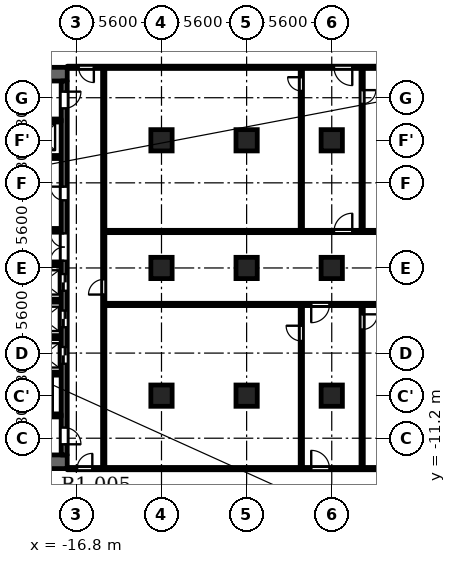
"""IFC4 building model, lengths in metres.
Left out: names, types, materials, properties, quantities, classifications, styles, units other than length and angle.
Written with IfcOpenShell. Run it as: python <this file> out.ifc"""

import sys

from ifc_helpers import new_model, si_unit, direction, frame, frame_2d, origin, origin_2d, place, context, subcontext, project, spatial, rectangle, extrude, element, fill, save


model = new_model("IFC4")
c1 = context("Model", 3, precision=1e-05, world=origin(), true_north=direction((0.0, 1.0)))
c2 = subcontext(c1, "Body", "Model", "MODEL_VIEW")
j1 = project(units=[si_unit("LENGTHUNIT", "METRE"), si_unit("PLANEANGLEUNIT", "RADIAN")], contexts=[c1])
p1 = place(None, origin())
s1 = spatial("IfcSite", under=j1, at=p1, CompositionType="ELEMENT")
p2 = place(p1, origin())
s2 = spatial("IfcBuilding", under=s1, at=p2, CompositionType="ELEMENT")
p3 = place(p2, frame((0.0, 0.0, -4.5)))
s3 = spatial("IfcBuildingStorey", under=s2, at=p3, CompositionType="ELEMENT", Elevation=-4.5)
for number, where, z_axis, x_axis in (
    (1, (-11.2, -8.4, 0.0), (0.0, 0.0, 1.0), (1.0, 0.0, 0.0)),
    (2, (-11.2, 8.4, 0.0), (0.0, 0.0, 1.0), (1.0, 0.0, 0.0)),
    (3, (-5.6, -8.4, 0.0), (0.0, 0.0, 1.0), (1.0, 0.0, 0.0)),
    (4, (-5.6, 8.4, 0.0), (0.0, 0.0, 1.0), (1.0, 0.0, 0.0)),
    (5, (0.0, -8.4, 0.0), (0.0, 0.0, 1.0), (1.0, 0.0, 0.0)),
    (6, (0.0, 8.4, 0.0), (0.0, 0.0, 1.0), (1.0, 0.0, 0.0)),
    (7, (-11.2, 0.0, 0.0), (0.0, 0.0, 1.0), (1.0, 0.0, 0.0)),
    (8, (-5.6, 0.0, 0.0), (0.0, 0.0, 1.0), (1.0, 0.0, 0.0)),
    (9, (0.0, 0.0, 0.0), (0.0, 0.0, 1.0), (1.0, 0.0, 0.0)),
):
    element("IfcColumn", number, at=place(p3, frame(where, z_axis=z_axis, x_axis=x_axis)), inside=s3, PredefinedType="COLUMN", context=c2, shape_type="SweptSolid", body=[
        extrude(rectangle(XDim=1.4, YDim=1.4, at=origin_2d()), origin(), (0.0, 0.0, 1.0), 4.5),
    ])
for number, where, z_axis, x_axis in (
    (10, (-17.4, 12.75, 0.0), (0.0, 0.0, 1.0), (-1.0, 0.0, 0.0)),
    (11, (-17.4, -12.75, 0.0), (0.0, 0.0, 1.0), (-1.0, 0.0, 0.0)),
):
    element("IfcWall", number, at=place(p3, frame(where, z_axis=z_axis, x_axis=x_axis)), inside=s3, PredefinedType="SHEAR", context=c2, shape_type="SweptSolid", body=[
        extrude(rectangle(XDim=10.4, YDim=0.9, at=frame_2d((5.2, 0.0))), origin(), (0.0, 0.0, 1.0), 4.05),
    ])
p4 = place(p3, frame((-17.6, -12.3, 0.0), z_axis=(0.0, 0.0, 1.0), x_axis=(0.0, 1.0, 0.0)))
e12 = element("IfcWall", 12, at=p4, inside=s3, PredefinedType="SHEAR", context=c2, shape_type="SweptSolid", body=[
    extrude(rectangle(XDim=24.6, YDim=0.4, at=frame_2d((12.3, 0.0))), origin(), (0.0, 0.0, 1.0), 4.05),
])
p5 = place(p4, frame((6.0, 0.0, 0.0)))
e13 = element("IfcOpeningElement", 13, at=p5, cuts=e12, PredefinedType="OPENING", context=c2, shape_type="SweptSolid", body=[
    extrude(rectangle(XDim=1.1, YDim=2.1, at=frame_2d((0.55, 1.05))), frame((0.0, 0.21, 0.0), z_axis=(0.0, -1.0, 0.0), x_axis=(1.0, 0.0, 0.0)), (0.0, 0.0, 1.0), 0.42),
])
p6 = place(p4, frame((8.4, 0.0, 0.0)))
e14 = element("IfcOpeningElement", 14, at=p6, cuts=e12, PredefinedType="OPENING", context=c2, shape_type="SweptSolid", body=[
    extrude(rectangle(XDim=1.1, YDim=2.1, at=frame_2d((0.55, 1.05))), frame((0.0, 0.21, 0.0), z_axis=(0.0, -1.0, 0.0), x_axis=(1.0, 0.0, 0.0)), (0.0, 0.0, 1.0), 0.42),
])
p7 = place(p4, frame((10.8, 0.0, 0.0)))
e15 = element("IfcOpeningElement", 15, at=p7, cuts=e12, PredefinedType="OPENING", context=c2, shape_type="SweptSolid", body=[
    extrude(rectangle(XDim=1.1, YDim=2.1, at=frame_2d((0.55, 1.05))), frame((0.0, 0.21, 0.0), z_axis=(0.0, -1.0, 0.0), x_axis=(1.0, 0.0, 0.0)), (0.0, 0.0, 1.0), 0.42),
])
p8 = place(p4, frame((16.75, 0.0, 0.0)))
e16 = element("IfcOpeningElement", 16, at=p8, cuts=e12, PredefinedType="OPENING", context=c2, shape_type="SweptSolid", body=[
    extrude(rectangle(XDim=0.9, YDim=2.1, at=frame_2d((0.45, 1.05))), frame((0.0, 0.21, 0.0), z_axis=(0.0, -1.0, 0.0), x_axis=(1.0, 0.0, 0.0)), (0.0, 0.0, 1.0), 0.42),
])
p9 = place(p4, frame((22.8, 0.0, 0.0)))
e17 = element("IfcOpeningElement", 17, at=p9, cuts=e12, PredefinedType="OPENING", context=c2, shape_type="SweptSolid", body=[
    extrude(rectangle(XDim=1.1, YDim=2.1, at=frame_2d((0.55, 1.05))), frame((0.0, 0.21, 0.0), z_axis=(0.0, -1.0, 0.0), x_axis=(1.0, 0.0, 0.0)), (0.0, 0.0, 1.0), 0.42),
])
p10 = place(p4, frame((0.7, 0.0, 0.0)))
e18 = element("IfcOpeningElement", 18, at=p10, cuts=e12, PredefinedType="OPENING", context=c2, shape_type="SweptSolid", body=[
    extrude(rectangle(XDim=1.1, YDim=2.1, at=frame_2d((0.55, 1.05))), frame((0.0, 0.21, 0.0), z_axis=(0.0, -1.0, 0.0), x_axis=(1.0, 0.0, 0.0)), (0.0, 0.0, 1.0), 0.42),
])
p11 = place(p4, frame((12.775, 0.0, 0.0)))
e19 = element("IfcOpeningElement", 19, at=p11, cuts=e12, PredefinedType="OPENING", context=c2, shape_type="SweptSolid", body=[
    extrude(rectangle(XDim=1.8, YDim=2.1, at=frame_2d((0.9, 1.05))), frame((0.0, 0.21, 0.0), z_axis=(0.0, -1.0, 0.0), x_axis=(1.0, 0.0, 0.0)), (0.0, 0.0, 1.0), 0.42),
])
p12 = place(p3, frame((-17.8, -9.7, 0.0), z_axis=(0.0, 0.0, 1.0), x_axis=(-1.0, 0.0, 0.0)))
e20 = element("IfcWall", 20, at=p12, inside=s3, PredefinedType="SHEAR", context=c2, shape_type="SweptSolid", body=[
    extrude(rectangle(XDim=8.3, YDim=0.2, at=frame_2d((4.15, 0.0))), origin(), (0.0, 0.0, 1.0), 4.05),
])
p13 = place(p12, frame((0.85, 0.0, 0.0)))
e21 = element("IfcOpeningElement", 21, at=p13, cuts=e20, PredefinedType="OPENING", context=c2, shape_type="SweptSolid", body=[
    extrude(rectangle(XDim=1.1, YDim=2.1, at=frame_2d((0.55, 1.05))), frame((0.0, 0.11, 0.0), z_axis=(0.0, -1.0, 0.0), x_axis=(1.0, 0.0, 0.0)), (0.0, 0.0, 1.0), 0.22),
])
p14 = place(p12, frame((3.75, 0.0, 0.0)))
e22 = element("IfcOpeningElement", 22, at=p14, cuts=e20, PredefinedType="OPENING", context=c2, shape_type="SweptSolid", body=[
    extrude(rectangle(XDim=1.1, YDim=2.1, at=frame_2d((0.55, 1.05))), frame((0.0, 0.11, 0.0), z_axis=(0.0, -1.0, 0.0), x_axis=(1.0, 0.0, 0.0)), (0.0, 0.0, 1.0), 0.22),
])
for number, where, z_axis, x_axis in (
    (23, (-17.8, -6.95, 0.0), (0.0, 0.0, 1.0), (-1.0, 0.0, 0.0)),
    (24, (-17.8, -4.55, 0.0), (0.0, 0.0, 1.0), (-1.0, 0.0, 0.0)),
    (25, (-17.8, -2.15, 0.0), (0.0, 0.0, 1.0), (-1.0, 0.0, 0.0)),
):
    element("IfcWall", number, at=place(p3, frame(where, z_axis=z_axis, x_axis=x_axis)), inside=s3, PredefinedType="PARTITIONING", context=c2, shape_type="SweptSolid", body=[
        extrude(rectangle(XDim=2.8, YDim=0.2, at=frame_2d((1.4, 0.0))), origin(), (0.0, 0.0, 1.0), 4.05),
    ])
for number, where, z_axis, x_axis in (
    (26, (-17.8, 0.25, 0.0), (0.0, 0.0, 1.0), (-1.0, 0.0, 0.0)),
    (27, (-17.8, 2.5, 0.0), (0.0, 0.0, 1.0), (-1.0, 0.0, 0.0)),
):
    element("IfcWall", number, at=place(p3, frame(where, z_axis=z_axis, x_axis=x_axis)), inside=s3, PredefinedType="PARTITIONING", context=c2, shape_type="SweptSolid", body=[
        extrude(rectangle(XDim=3.0, YDim=0.2, at=frame_2d((1.5, 0.0))), origin(), (0.0, 0.0, 1.0), 4.05),
    ])
p15 = place(p3, frame((-17.8, 7.3, 0.0), z_axis=(0.0, 0.0, 1.0), x_axis=(-1.0, 0.0, 0.0)))
e28 = element("IfcWall", 28, at=p15, inside=s3, PredefinedType="PARTITIONING", context=c2, shape_type="SweptSolid", body=[
    extrude(rectangle(XDim=2.8, YDim=0.2, at=frame_2d((1.4, 0.0))), origin(), (0.0, 0.0, 1.0), 4.05),
])
p16 = place(p3, frame((-17.8, 9.7, 0.0), z_axis=(0.0, 0.0, 1.0), x_axis=(-1.0, 0.0, 0.0)))
e29 = element("IfcWall", 29, at=p16, inside=s3, PredefinedType="SHEAR", context=c2, shape_type="SweptSolid", body=[
    extrude(rectangle(XDim=8.3, YDim=0.2, at=frame_2d((4.15, 0.0))), origin(), (0.0, 0.0, 1.0), 4.05),
])
p17 = place(p16, frame((0.85, 0.0, 0.0)))
e30 = element("IfcOpeningElement", 30, at=p17, cuts=e29, PredefinedType="OPENING", context=c2, shape_type="SweptSolid", body=[
    extrude(rectangle(XDim=1.1, YDim=2.1, at=frame_2d((0.55, 1.05))), frame((0.0, 0.11, 0.0), z_axis=(0.0, -1.0, 0.0), x_axis=(1.0, 0.0, 0.0)), (0.0, 0.0, 1.0), 0.22),
])
p18 = place(p16, frame((3.75, 0.0, 0.0)))
e31 = element("IfcOpeningElement", 31, at=p18, cuts=e29, PredefinedType="OPENING", context=c2, shape_type="SweptSolid", body=[
    extrude(rectangle(XDim=1.1, YDim=2.1, at=frame_2d((0.55, 1.05))), frame((0.0, 0.11, 0.0), z_axis=(0.0, -1.0, 0.0), x_axis=(1.0, 0.0, 0.0)), (0.0, 0.0, 1.0), 0.22),
])
p19 = place(p3, frame((-17.4, -13.2, 0.0), z_axis=(0.0, 0.0, 1.0), x_axis=(1.0, 0.0, 0.0)))
e32 = element("IfcWall", 32, at=p19, inside=s3, PredefinedType="PARTITIONING", context=c2, shape_type="SweptSolid", body=[
    extrude(rectangle(XDim=34.8, YDim=0.15, at=frame_2d((17.4, 0.0))), origin(), (0.0, 0.0, 1.0), 4.05),
])
p20 = place(p19, frame((16.05, 0.0, 0.0)))
e33 = element("IfcOpeningElement", 33, at=p20, cuts=e32, PredefinedType="OPENING", context=c2, shape_type="SweptSolid", body=[
    extrude(rectangle(XDim=1.2, YDim=2.1, at=frame_2d((0.6, 1.05))), frame((0.0, 0.085, 0.0), z_axis=(0.0, -1.0, 0.0), x_axis=(1.0, 0.0, 0.0)), (0.0, 0.0, 1.0), 0.17),
])
p21 = place(p19, frame((0.65, 0.0, 0.0)))
e34 = element("IfcOpeningElement", 34, at=p21, cuts=e32, PredefinedType="OPENING", context=c2, shape_type="SweptSolid", body=[
    extrude(rectangle(XDim=1.0, YDim=2.1, at=frame_2d((0.5, 1.05))), frame((0.0, 0.085, 0.0), z_axis=(0.0, -1.0, 0.0), x_axis=(1.0, 0.0, 0.0)), (0.0, 0.0, 1.0), 0.17),
])
p22 = place(p19, frame((33.05, 0.0, 0.0)))
e35 = element("IfcOpeningElement", 35, at=p22, cuts=e32, PredefinedType="OPENING", context=c2, shape_type="SweptSolid", body=[
    extrude(rectangle(XDim=1.0, YDim=2.1, at=frame_2d((0.5, 1.05))), frame((0.0, 0.085, 0.0), z_axis=(0.0, -1.0, 0.0), x_axis=(1.0, 0.0, 0.0)), (0.0, 0.0, 1.0), 0.17),
])
p23 = place(p3, frame((-14.925, -2.4, 0.0), z_axis=(0.0, 0.0, 1.0), x_axis=(1.0, 0.0, 0.0)))
e36 = element("IfcWall", 36, at=p23, inside=s3, PredefinedType="PARTITIONING", context=c2, shape_type="SweptSolid", body=[
    extrude(rectangle(XDim=29.85, YDim=0.15, at=frame_2d((14.925, 0.0))), origin(), (0.0, 0.0, 1.0), 4.05),
])
p24 = place(p23, frame((13.575, 0.0, 0.0)))
e37 = element("IfcOpeningElement", 37, at=p24, cuts=e36, PredefinedType="OPENING", context=c2, shape_type="SweptSolid", body=[
    extrude(rectangle(XDim=1.2, YDim=2.1, at=frame_2d((0.6, 1.05))), frame((0.0, 0.085, 0.0), z_axis=(0.0, -1.0, 0.0), x_axis=(1.0, 0.0, 0.0)), (0.0, 0.0, 1.0), 0.17),
])
p25 = place(p3, frame((-14.925, 2.4, 0.0), z_axis=(0.0, 0.0, 1.0), x_axis=(1.0, 0.0, 0.0)))
e38 = element("IfcWall", 38, at=p25, inside=s3, PredefinedType="PARTITIONING", context=c2, shape_type="SweptSolid", body=[
    extrude(rectangle(XDim=29.85, YDim=0.15, at=frame_2d((14.925, 0.0))), origin(), (0.0, 0.0, 1.0), 4.05),
])
p26 = place(p25, frame((15.075, 0.0, 0.0)))
e39 = element("IfcOpeningElement", 39, at=p26, cuts=e38, PredefinedType="OPENING", context=c2, shape_type="SweptSolid", body=[
    extrude(rectangle(XDim=1.2, YDim=2.1, at=frame_2d((0.6, 1.05))), frame((0.0, 0.085, 0.0), z_axis=(0.0, -1.0, 0.0), x_axis=(1.0, 0.0, 0.0)), (0.0, 0.0, 1.0), 0.17),
])
p27 = place(p3, frame((-17.4, 13.2, 0.0), z_axis=(0.0, 0.0, 1.0), x_axis=(1.0, 0.0, 0.0)))
e40 = element("IfcWall", 40, at=p27, inside=s3, PredefinedType="PARTITIONING", context=c2, shape_type="SweptSolid", body=[
    extrude(rectangle(XDim=34.8, YDim=0.15, at=frame_2d((17.4, 0.0))), origin(), (0.0, 0.0, 1.0), 4.05),
])
p28 = place(p27, frame((17.55, 0.0, 0.0)))
e41 = element("IfcOpeningElement", 41, at=p28, cuts=e40, PredefinedType="OPENING", context=c2, shape_type="SweptSolid", body=[
    extrude(rectangle(XDim=1.2, YDim=2.1, at=frame_2d((0.6, 1.05))), frame((0.0, 0.085, 0.0), z_axis=(0.0, -1.0, 0.0), x_axis=(1.0, 0.0, 0.0)), (0.0, 0.0, 1.0), 0.17),
])
p29 = place(p27, frame((0.75, 0.0, 0.0)))
e42 = element("IfcOpeningElement", 42, at=p29, cuts=e40, PredefinedType="OPENING", context=c2, shape_type="SweptSolid", body=[
    extrude(rectangle(XDim=1.0, YDim=2.1, at=frame_2d((0.5, 1.05))), frame((0.0, 0.085, 0.0), z_axis=(0.0, -1.0, 0.0), x_axis=(1.0, 0.0, 0.0)), (0.0, 0.0, 1.0), 0.17),
])
p30 = place(p27, frame((33.15, 0.0, 0.0)))
e43 = element("IfcOpeningElement", 43, at=p30, cuts=e40, PredefinedType="OPENING", context=c2, shape_type="SweptSolid", body=[
    extrude(rectangle(XDim=1.0, YDim=2.1, at=frame_2d((0.5, 1.05))), frame((0.0, 0.085, 0.0), z_axis=(0.0, -1.0, 0.0), x_axis=(1.0, 0.0, 0.0)), (0.0, 0.0, 1.0), 0.17),
])
p31 = place(p3, frame((-15.0, -13.125, 0.0), z_axis=(0.0, 0.0, 1.0), x_axis=(0.0, 1.0, 0.0)))
e44 = element("IfcWall", 44, at=p31, inside=s3, PredefinedType="PARTITIONING", context=c2, shape_type="SweptSolid", body=[
    extrude(rectangle(XDim=26.25, YDim=0.15, at=frame_2d((13.125, 0.0))), origin(), (0.0, 0.0, 1.0), 4.05),
])
p32 = place(p31, frame((11.375, 0.0, 0.0)))
e45 = element("IfcOpeningElement", 45, at=p32, cuts=e44, PredefinedType="OPENING", context=c2, shape_type="SweptSolid", body=[
    extrude(rectangle(XDim=1.0, YDim=2.1, at=frame_2d((0.5, 1.05))), frame((0.0, 0.085, 0.0), z_axis=(0.0, -1.0, 0.0), x_axis=(1.0, 0.0, 0.0)), (0.0, 0.0, 1.0), 0.17),
])
p33 = place(p3, frame((-2.0, -13.125, 0.0), z_axis=(0.0, 0.0, 1.0), x_axis=(0.0, 1.0, 0.0)))
e46 = element("IfcWall", 46, at=p33, inside=s3, PredefinedType="PARTITIONING", context=c2, shape_type="SweptSolid", body=[
    extrude(rectangle(XDim=10.65, YDim=0.15, at=frame_2d((5.325, 0.0))), origin(), (0.0, 0.0, 1.0), 4.05),
])
p34 = place(p33, frame((8.325, 0.0, 0.0)))
e47 = element("IfcOpeningElement", 47, at=p34, cuts=e46, PredefinedType="OPENING", context=c2, shape_type="SweptSolid", body=[
    extrude(rectangle(XDim=1.0, YDim=2.1, at=frame_2d((0.5, 1.05))), frame((0.0, 0.085, 0.0), z_axis=(0.0, -1.0, 0.0), x_axis=(1.0, 0.0, 0.0)), (0.0, 0.0, 1.0), 0.17),
])
p35 = place(p3, frame((-2.0, 2.475, 0.0), z_axis=(0.0, 0.0, 1.0), x_axis=(0.0, 1.0, 0.0)))
e48 = element("IfcWall", 48, at=p35, inside=s3, PredefinedType="PARTITIONING", context=c2, shape_type="SweptSolid", body=[
    extrude(rectangle(XDim=10.65, YDim=0.15, at=frame_2d((5.325, 0.0))), origin(), (0.0, 0.0, 1.0), 4.05),
])
p36 = place(p35, frame((9.175, 0.0, 0.0)))
e49 = element("IfcOpeningElement", 49, at=p36, cuts=e48, PredefinedType="OPENING", context=c2, shape_type="SweptSolid", body=[
    extrude(rectangle(XDim=0.9, YDim=2.1, at=frame_2d((0.45, 1.05))), frame((0.0, 0.085, 0.0), z_axis=(0.0, -1.0, 0.0), x_axis=(1.0, 0.0, 0.0)), (0.0, 0.0, 1.0), 0.17),
])
p37 = place(p3, frame((2.0, -13.125, 0.0), z_axis=(0.0, 0.0, 1.0), x_axis=(0.0, 1.0, 0.0)))
e50 = element("IfcWall", 50, at=p37, inside=s3, PredefinedType="PARTITIONING", context=c2, shape_type="SweptSolid", body=[
    extrude(rectangle(XDim=10.65, YDim=0.15, at=frame_2d((5.325, 0.0))), origin(), (0.0, 0.0, 1.0), 4.05),
])
p38 = place(p37, frame((9.075, 0.0, 0.0)))
e51 = element("IfcOpeningElement", 51, at=p38, cuts=e50, PredefinedType="OPENING", context=c2, shape_type="SweptSolid", body=[
    extrude(rectangle(XDim=1.0, YDim=2.1, at=frame_2d((0.5, 1.05))), frame((0.0, 0.085, 0.0), z_axis=(0.0, -1.0, 0.0), x_axis=(1.0, 0.0, 0.0)), (0.0, 0.0, 1.0), 0.17),
])
p39 = place(p3, frame((2.0, 2.475, 0.0), z_axis=(0.0, 0.0, 1.0), x_axis=(0.0, 1.0, 0.0)))
e52 = element("IfcWall", 52, at=p39, inside=s3, PredefinedType="PARTITIONING", context=c2, shape_type="SweptSolid", body=[
    extrude(rectangle(XDim=10.65, YDim=0.15, at=frame_2d((5.325, 0.0))), origin(), (0.0, 0.0, 1.0), 4.05),
])
p40 = place(p39, frame((8.325, 0.0, 0.0)))
e53 = element("IfcOpeningElement", 53, at=p40, cuts=e52, PredefinedType="OPENING", context=c2, shape_type="SweptSolid", body=[
    extrude(rectangle(XDim=0.9, YDim=2.1, at=frame_2d((0.45, 1.05))), frame((0.0, 0.085, 0.0), z_axis=(0.0, -1.0, 0.0), x_axis=(1.0, 0.0, 0.0)), (0.0, 0.0, 1.0), 0.17),
])
p41 = place(p5, origin())
e54 = element("IfcDoor", 54, at=p41, inside=s3, OperationType="DOUBLE_DOOR_SLIDING", PredefinedType="DOOR", context=c2, shape_type="SweptSolid", body=[
    extrude(rectangle(XDim=1.1, YDim=2.1, at=frame_2d((0.55, 1.05))), frame((0.0, 0.025, 0.0), z_axis=(0.0, -1.0, 0.0), x_axis=(1.0, 0.0, 0.0)), (0.0, 0.0, 1.0), 0.05),
])
fill(e13, e54)
p42 = place(p6, origin())
e55 = element("IfcDoor", 55, at=p42, inside=s3, OperationType="DOUBLE_DOOR_SLIDING", PredefinedType="DOOR", context=c2, shape_type="SweptSolid", body=[
    extrude(rectangle(XDim=1.1, YDim=2.1, at=frame_2d((0.55, 1.05))), frame((0.0, 0.025, 0.0), z_axis=(0.0, -1.0, 0.0), x_axis=(1.0, 0.0, 0.0)), (0.0, 0.0, 1.0), 0.05),
])
fill(e14, e55)
p43 = place(p7, origin())
e56 = element("IfcDoor", 56, at=p43, inside=s3, OperationType="DOUBLE_DOOR_SLIDING", PredefinedType="DOOR", context=c2, shape_type="SweptSolid", body=[
    extrude(rectangle(XDim=1.1, YDim=2.1, at=frame_2d((0.55, 1.05))), frame((0.0, 0.025, 0.0), z_axis=(0.0, -1.0, 0.0), x_axis=(1.0, 0.0, 0.0)), (0.0, 0.0, 1.0), 0.05),
])
fill(e15, e56)
p44 = place(p8, origin())
e57 = element("IfcDoor", 57, at=p44, inside=s3, OperationType="SINGLE_SWING_LEFT", PredefinedType="DOOR", context=c2, shape_type="SweptSolid", body=[
    extrude(rectangle(XDim=0.9, YDim=2.1, at=frame_2d((0.45, 1.05))), frame((0.0, 0.025, 0.0), z_axis=(0.0, -1.0, 0.0), x_axis=(1.0, 0.0, 0.0)), (0.0, 0.0, 1.0), 0.05),
])
fill(e16, e57)
p45 = place(p9, origin())
e58 = element("IfcDoor", 58, at=p45, inside=s3, OperationType="SINGLE_SWING_RIGHT", PredefinedType="DOOR", context=c2, shape_type="SweptSolid", body=[
    extrude(rectangle(XDim=1.1, YDim=2.1, at=frame_2d((0.55, 1.05))), frame((0.0, 0.025, 0.0), z_axis=(0.0, -1.0, 0.0), x_axis=(1.0, 0.0, 0.0)), (0.0, 0.0, 1.0), 0.05),
])
fill(e17, e58)
p46 = place(p10, origin())
e59 = element("IfcDoor", 59, at=p46, inside=s3, OperationType="SINGLE_SWING_LEFT", PredefinedType="DOOR", context=c2, shape_type="SweptSolid", body=[
    extrude(rectangle(XDim=1.1, YDim=2.1, at=frame_2d((0.55, 1.05))), frame((0.0, 0.025, 0.0), z_axis=(0.0, -1.0, 0.0), x_axis=(1.0, 0.0, 0.0)), (0.0, 0.0, 1.0), 0.05),
])
fill(e18, e59)
p47 = place(p11, origin())
e60 = element("IfcDoor", 60, at=p47, inside=s3, OperationType="DOUBLE_DOOR_SINGLE_SWING", PredefinedType="DOOR", context=c2, shape_type="SweptSolid", body=[
    extrude(rectangle(XDim=1.8, YDim=2.1, at=frame_2d((0.9, 1.05))), frame((0.0, 0.025, 0.0), z_axis=(0.0, -1.0, 0.0), x_axis=(1.0, 0.0, 0.0)), (0.0, 0.0, 1.0), 0.05),
])
fill(e19, e60)
p48 = place(p32, origin())
e61 = element("IfcDoor", 61, at=p48, inside=s3, OperationType="SINGLE_SWING_RIGHT", PredefinedType="DOOR", context=c2, shape_type="SweptSolid", body=[
    extrude(rectangle(XDim=1.0, YDim=2.1, at=frame_2d((0.5, 1.05))), frame((0.0, 0.025, 0.0), z_axis=(0.0, -1.0, 0.0), x_axis=(1.0, 0.0, 0.0)), (0.0, 0.0, 1.0), 0.05),
])
fill(e45, e61)
p49 = place(p26, origin())
e62 = element("IfcDoor", 62, at=p49, inside=s3, OperationType="SINGLE_SWING_LEFT", PredefinedType="DOOR", context=c2, shape_type="SweptSolid", body=[
    extrude(rectangle(XDim=1.2, YDim=2.1, at=frame_2d((0.6, 1.05))), frame((0.0, 0.025, 0.0), z_axis=(0.0, -1.0, 0.0), x_axis=(1.0, 0.0, 0.0)), (0.0, 0.0, 1.0), 0.05),
])
fill(e39, e62)
p50 = place(p28, origin())
e63 = element("IfcDoor", 63, at=p50, inside=s3, OperationType="SINGLE_SWING_RIGHT", PredefinedType="DOOR", context=c2, shape_type="SweptSolid", body=[
    extrude(rectangle(XDim=1.2, YDim=2.1, at=frame_2d((0.6, 1.05))), frame((0.0, 0.025, 0.0), z_axis=(0.0, -1.0, 0.0), x_axis=(1.0, 0.0, 0.0)), (0.0, 0.0, 1.0), 0.05),
])
fill(e41, e63)
p51 = place(p29, origin())
e64 = element("IfcDoor", 64, at=p51, inside=s3, OperationType="SINGLE_SWING_RIGHT", PredefinedType="DOOR", context=c2, shape_type="SweptSolid", body=[
    extrude(rectangle(XDim=1.0, YDim=2.1, at=frame_2d((0.5, 1.05))), frame((0.0, 0.025, 0.0), z_axis=(0.0, -1.0, 0.0), x_axis=(1.0, 0.0, 0.0)), (0.0, 0.0, 1.0), 0.05),
])
fill(e42, e64)
p52 = place(p24, origin())
e65 = element("IfcDoor", 65, at=p52, inside=s3, OperationType="SINGLE_SWING_LEFT", PredefinedType="DOOR", context=c2, shape_type="SweptSolid", body=[
    extrude(rectangle(XDim=1.2, YDim=2.1, at=frame_2d((0.6, 1.05))), frame((0.0, 0.025, 0.0), z_axis=(0.0, -1.0, 0.0), x_axis=(1.0, 0.0, 0.0)), (0.0, 0.0, 1.0), 0.05),
])
fill(e37, e65)
p53 = place(p20, origin())
e66 = element("IfcDoor", 66, at=p53, inside=s3, OperationType="SINGLE_SWING_RIGHT", PredefinedType="DOOR", context=c2, shape_type="SweptSolid", body=[
    extrude(rectangle(XDim=1.2, YDim=2.1, at=frame_2d((0.6, 1.05))), frame((0.0, 0.025, 0.0), z_axis=(0.0, -1.0, 0.0), x_axis=(1.0, 0.0, 0.0)), (0.0, 0.0, 1.0), 0.05),
])
fill(e33, e66)
p54 = place(p21, origin())
e67 = element("IfcDoor", 67, at=p54, inside=s3, OperationType="SINGLE_SWING_LEFT", PredefinedType="DOOR", context=c2, shape_type="SweptSolid", body=[
    extrude(rectangle(XDim=1.0, YDim=2.1, at=frame_2d((0.5, 1.05))), frame((0.0, 0.025, 0.0), z_axis=(0.0, -1.0, 0.0), x_axis=(1.0, 0.0, 0.0)), (0.0, 0.0, 1.0), 0.05),
])
fill(e34, e67)
p55 = place(p36, origin())
e68 = element("IfcDoor", 68, at=p55, inside=s3, OperationType="SINGLE_SWING_LEFT", PredefinedType="DOOR", context=c2, shape_type="SweptSolid", body=[
    extrude(rectangle(XDim=0.9, YDim=2.1, at=frame_2d((0.45, 1.05))), frame((0.0, 0.025, 0.0), z_axis=(0.0, -1.0, 0.0), x_axis=(1.0, 0.0, 0.0)), (0.0, 0.0, 1.0), 0.05),
])
fill(e49, e68)
p56 = place(p40, origin())
e69 = element("IfcDoor", 69, at=p56, inside=s3, OperationType="SINGLE_SWING_RIGHT", PredefinedType="DOOR", context=c2, shape_type="SweptSolid", body=[
    extrude(rectangle(XDim=0.9, YDim=2.1, at=frame_2d((0.45, 1.05))), frame((0.0, 0.025, 0.0), z_axis=(0.0, -1.0, 0.0), x_axis=(1.0, 0.0, 0.0)), (0.0, 0.0, 1.0), 0.05),
])
fill(e53, e69)
p57 = place(p34, origin())
e70 = element("IfcDoor", 70, at=p57, inside=s3, OperationType="SINGLE_SWING_LEFT", PredefinedType="DOOR", context=c2, shape_type="SweptSolid", body=[
    extrude(rectangle(XDim=1.0, YDim=2.1, at=frame_2d((0.5, 1.05))), frame((0.0, 0.025, 0.0), z_axis=(0.0, -1.0, 0.0), x_axis=(1.0, 0.0, 0.0)), (0.0, 0.0, 1.0), 0.05),
])
fill(e47, e70)
p58 = place(p38, origin())
e71 = element("IfcDoor", 71, at=p58, inside=s3, OperationType="SINGLE_SWING_RIGHT", PredefinedType="DOOR", context=c2, shape_type="SweptSolid", body=[
    extrude(rectangle(XDim=1.0, YDim=2.1, at=frame_2d((0.5, 1.05))), frame((0.0, 0.025, 0.0), z_axis=(0.0, -1.0, 0.0), x_axis=(1.0, 0.0, 0.0)), (0.0, 0.0, 1.0), 0.05),
])
fill(e51, e71)
save(model, sys.argv[1])
